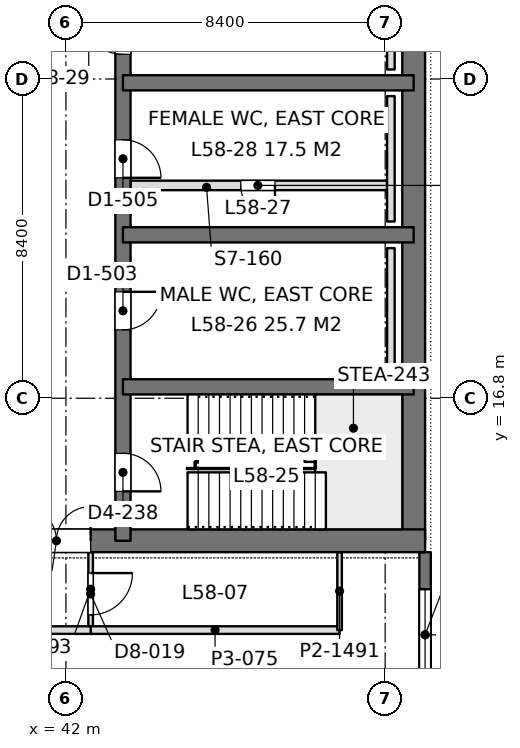
"""IFC4 building model, lengths in metres.
Left out: names, types, materials, properties, quantities, classifications, styles, units other than length and angle.
Written with IfcOpenShell. Run it as: python <this file> out.ifc"""

import sys

from ifc_helpers import new_model, si_unit, direction, frame, frame_2d, origin, place, context, subcontext, project, spatial, rectangle, extrude, element, fill, save


model = new_model("IFC4")
c1 = context("Model", 3, precision=1e-05, world=origin(), true_north=direction((0.0, 1.0)))
c2 = subcontext(c1, "Body", "Model", "MODEL_VIEW")
j1 = project(units=[si_unit("LENGTHUNIT", "METRE"), si_unit("PLANEANGLEUNIT", "RADIAN")], contexts=[c1])
p1 = place(None, origin())
s1 = spatial("IfcSite", under=j1, at=p1, CompositionType="ELEMENT")
p2 = place(p1, origin())
s2 = spatial("IfcBuilding", under=s1, at=p2, CompositionType="ELEMENT")
p3 = place(p2, frame((0.0, 0.0, 254.7)))
s3 = spatial("IfcBuildingStorey", under=s2, at=p3, CompositionType="ELEMENT", Elevation=254.7)
p4 = place(p3, frame((33.75, 13.05, 0.0), z_axis=(0.0, 0.0, 1.0), x_axis=(1.0, 0.0, 0.0)))
e1 = element("IfcWall", 1, at=p4, inside=s3, PredefinedType="SHEAR", context=c2, shape_type="SweptSolid", body=[
    extrude(rectangle(XDim=17.7, YDim=0.6, at=frame_2d((8.85, 0.0))), origin(), (0.0, 0.0, 1.0), 4.5),
])
p5 = place(p4, frame((7.1, 0.0, 0.0)))
e2 = element("IfcOpeningElement", 2, at=p5, cuts=e1, PredefinedType="OPENING", context=c2, shape_type="SweptSolid", body=[
    extrude(rectangle(XDim=1.8, YDim=2.4, at=frame_2d((0.9, 1.2))), frame((0.0, 0.31, 0.0), z_axis=(0.0, -1.0, 0.0), x_axis=(1.0, 0.0, 0.0)), (0.0, 0.0, 1.0), 0.62),
])
p6 = place(p3, frame((51.15, 13.05, 0.0), z_axis=(0.0, 0.0, 1.0), x_axis=(0.0, 1.0, 0.0)))
e3 = element("IfcWall", 3, at=p6, inside=s3, PredefinedType="SHEAR", context=c2, shape_type="SweptSolid", body=[
    extrude(rectangle(XDim=24.3, YDim=0.6, at=frame_2d((12.15, 0.0))), origin(), (0.0, 0.0, 1.0), 4.5),
])
p7 = place(p3, frame((43.5, 13.05, 0.0), z_axis=(0.0, 0.0, 1.0), x_axis=(0.0, 1.0, 0.0)))
e4 = element("IfcWall", 4, at=p7, inside=s3, PredefinedType="SHEAR", context=c2, shape_type="SweptSolid", body=[
    extrude(rectangle(XDim=24.3, YDim=0.4, at=frame_2d((12.15, 0.0))), origin(), (0.0, 0.0, 1.0), 4.5),
])
p8 = place(p7, frame((1.3, 0.0, 0.0)))
e5 = element("IfcOpeningElement", 5, at=p8, cuts=e4, PredefinedType="OPENING", context=c2, shape_type="SweptSolid", body=[
    extrude(rectangle(XDim=1.0, YDim=2.2, at=frame_2d((0.5, 1.1))), frame((0.0, 0.21, 0.0), z_axis=(0.0, -1.0, 0.0), x_axis=(1.0, 0.0, 0.0)), (0.0, 0.0, 1.0), 0.42),
])
p9 = place(p7, frame((22.0, 0.0, 0.0)))
e6 = element("IfcOpeningElement", 6, at=p9, cuts=e4, PredefinedType="OPENING", context=c2, shape_type="SweptSolid", body=[
    extrude(rectangle(XDim=1.0, YDim=2.2, at=frame_2d((0.5, 1.1))), frame((0.0, 0.21, 0.0), z_axis=(0.0, -1.0, 0.0), x_axis=(1.0, 0.0, 0.0)), (0.0, 0.0, 1.0), 0.42),
])
p10 = place(p7, frame((5.55, 0.0, 0.0)))
e7 = element("IfcOpeningElement", 7, at=p10, cuts=e4, PredefinedType="OPENING", context=c2, shape_type="SweptSolid", body=[
    extrude(rectangle(XDim=1.0, YDim=2.2, at=frame_2d((0.5, 1.1))), frame((0.0, 0.21, 0.0), z_axis=(0.0, -1.0, 0.0), x_axis=(1.0, 0.0, 0.0)), (0.0, 0.0, 1.0), 0.42),
])
p11 = place(p7, frame((9.55, 0.0, 0.0)))
e8 = element("IfcOpeningElement", 8, at=p11, cuts=e4, PredefinedType="OPENING", context=c2, shape_type="SweptSolid", body=[
    extrude(rectangle(XDim=1.0, YDim=2.2, at=frame_2d((0.5, 1.1))), frame((0.0, 0.21, 0.0), z_axis=(0.0, -1.0, 0.0), x_axis=(1.0, 0.0, 0.0)), (0.0, 0.0, 1.0), 0.42),
])
p12 = place(p7, frame((12.8, 0.0, 0.0)))
e9 = element("IfcOpeningElement", 9, at=p12, cuts=e4, PredefinedType="OPENING", context=c2, shape_type="SweptSolid", body=[
    extrude(rectangle(XDim=1.1, YDim=2.2, at=frame_2d((0.55, 1.1))), frame((0.0, 0.21, 0.0), z_axis=(0.0, -1.0, 0.0), x_axis=(1.0, 0.0, 0.0)), (0.0, 0.0, 1.0), 0.42),
])
p13 = place(p7, frame((15.538, 0.0, 0.0)))
e10 = element("IfcOpeningElement", 10, at=p13, cuts=e4, PredefinedType="OPENING", context=c2, shape_type="SweptSolid", body=[
    extrude(rectangle(XDim=1.1, YDim=2.2, at=frame_2d((0.55, 1.1))), frame((0.0, 0.21, 0.0), z_axis=(0.0, -1.0, 0.0), x_axis=(1.0, 0.0, 0.0)), (0.0, 0.0, 1.0), 0.42),
])
p14 = place(p7, frame((18.262, 0.0, 0.0)))
e11 = element("IfcOpeningElement", 11, at=p14, cuts=e4, PredefinedType="OPENING", context=c2, shape_type="SweptSolid", body=[
    extrude(rectangle(XDim=1.1, YDim=2.2, at=frame_2d((0.55, 1.1))), frame((0.0, 0.21, 0.0), z_axis=(0.0, -1.0, 0.0), x_axis=(1.0, 0.0, 0.0)), (0.0, 0.0, 1.0), 0.42),
])
for number, where, z_axis, x_axis in (
    (12, (51.15, 17.1, 0.0), (0.0, 0.0, 1.0), (-1.0, 0.0, 0.0)),
    (13, (51.15, 21.1, 0.0), (0.0, 0.0, 1.0), (-1.0, 0.0, 0.0)),
    (14, (51.15, 25.1, 0.0), (0.0, 0.0, 1.0), (-1.0, 0.0, 0.0)),
):
    element("IfcWall", number, at=place(p3, frame(where, z_axis=z_axis, x_axis=x_axis)), inside=s3, PredefinedType="SHEAR", context=c2, shape_type="SweptSolid", body=[
        extrude(rectangle(XDim=7.65, YDim=0.4, at=frame_2d((3.825, 0.0))), origin(), (0.0, 0.0, 1.0), 4.5),
    ])
p15 = place(p3, frame((51.45, 12.75, 0.0), z_axis=(0.0, 0.0, 1.0), x_axis=(0.0, -1.0, 0.0)))
e15 = element("IfcWall", 15, at=p15, inside=s3, PredefinedType="SOLIDWALL", context=c2, shape_type="SweptSolid", body=[
    extrude(rectangle(XDim=4.35, YDim=0.3, at=frame_2d((2.175, 0.0))), origin(), (0.0, 0.0, 1.0), 4.35),
])
p16 = place(p15, frame((0.975, 0.0, 0.9)))
e16 = element("IfcOpeningElement", 16, at=p16, cuts=e15, PredefinedType="OPENING", context=c2, shape_type="SweptSolid", body=[
    extrude(rectangle(XDim=2.4, YDim=1.9, at=frame_2d((1.2, 0.95))), frame((0.0, 0.16, 0.0), z_axis=(0.0, -1.0, 0.0), x_axis=(1.0, 0.0, 0.0)), (0.0, 0.0, 1.0), 0.32),
])
p17 = place(p3, frame((7.748, 10.7, 0.0), z_axis=(0.0, 0.0, 1.0), x_axis=(1.0, 0.0, 0.0)))
e17 = element("IfcWall", 17, at=p17, inside=s3, PredefinedType="PARTITIONING", context=c2, shape_type="SweptSolid", body=[
    extrude(rectangle(XDim=34.904, YDim=0.2, at=frame_2d((17.452, 0.0))), origin(), (0.0, 0.0, 1.0), 3.8),
])
p18 = place(p17, frame((4.919, 0.0, 0.0)))
e18 = element("IfcOpeningElement", 18, at=p18, cuts=e17, PredefinedType="OPENING", context=c2, shape_type="SweptSolid", body=[
    extrude(rectangle(XDim=1.8, YDim=2.2, at=frame_2d((0.9, 1.1))), frame((0.0, 0.11, 0.0), z_axis=(0.0, -1.0, 0.0), x_axis=(1.0, 0.0, 0.0)), (0.0, 0.0, 1.0), 0.22),
])
p19 = place(p17, frame((10.735, 0.0, 0.0)))
e19 = element("IfcOpeningElement", 19, at=p19, cuts=e17, PredefinedType="OPENING", context=c2, shape_type="SweptSolid", body=[
    extrude(rectangle(XDim=1.8, YDim=2.2, at=frame_2d((0.9, 1.1))), frame((0.0, 0.11, 0.0), z_axis=(0.0, -1.0, 0.0), x_axis=(1.0, 0.0, 0.0)), (0.0, 0.0, 1.0), 0.22),
])
p20 = place(p17, frame((22.369, 0.0, 0.0)))
e20 = element("IfcOpeningElement", 20, at=p20, cuts=e17, PredefinedType="OPENING", context=c2, shape_type="SweptSolid", body=[
    extrude(rectangle(XDim=1.8, YDim=2.2, at=frame_2d((0.9, 1.1))), frame((0.0, 0.11, 0.0), z_axis=(0.0, -1.0, 0.0), x_axis=(1.0, 0.0, 0.0)), (0.0, 0.0, 1.0), 0.22),
])
p21 = place(p17, frame((28.185, 0.0, 0.0)))
e21 = element("IfcOpeningElement", 21, at=p21, cuts=e17, PredefinedType="OPENING", context=c2, shape_type="SweptSolid", body=[
    extrude(rectangle(XDim=1.8, YDim=2.2, at=frame_2d((0.9, 1.1))), frame((0.0, 0.11, 0.0), z_axis=(0.0, -1.0, 0.0), x_axis=(1.0, 0.0, 0.0)), (0.0, 0.0, 1.0), 0.22),
])
p22 = place(p3, frame((42.65, 10.798, 0.0), z_axis=(0.0, 0.0, 1.0), x_axis=(0.0, 1.0, 0.0)))
e22 = element("IfcWall", 22, at=p22, inside=s3, PredefinedType="PARTITIONING", context=c2, shape_type="SweptSolid", body=[
    extrude(rectangle(XDim=1.954, YDim=0.12, at=frame_2d((0.977, 0.0))), origin(), (0.0, 0.0, 1.0), 4.35),
])
p23 = place(p22, frame((0.302, 0.0, 0.0)))
e23 = element("IfcOpeningElement", 23, at=p23, cuts=e22, PredefinedType="OPENING", context=c2, shape_type="SweptSolid", body=[
    extrude(rectangle(XDim=1.1, YDim=2.4, at=frame_2d((0.55, 1.2))), frame((0.0, 0.07, 0.0), z_axis=(0.0, -1.0, 0.0), x_axis=(1.0, 0.0, 0.0)), (0.0, 0.0, 1.0), 0.14),
])
p24 = place(p3, frame((42.648, 10.7, 0.0), z_axis=(0.0, 0.0, 1.0), x_axis=(1.0, 0.0, 0.0)))
e24 = element("IfcWall", 24, at=p24, inside=s3, PredefinedType="PARTITIONING", context=c2, shape_type="SweptSolid", body=[
    extrude(rectangle(XDim=6.552, YDim=0.2, at=frame_2d((3.276, 0.0))), origin(), (0.0, 0.0, 1.0), 4.35),
])
p25 = place(p3, frame((49.2, 10.7, 0.0), z_axis=(0.0, 0.0, 1.0), x_axis=(0.0, 1.0, 0.0)))
e25 = element("IfcWall", 25, at=p25, inside=s3, PredefinedType="PARTITIONING", context=c2, shape_type="SweptSolid", body=[
    extrude(rectangle(XDim=2.052, YDim=0.12, at=frame_2d((1.026, 0.0))), origin(), (0.0, 0.0, 1.0), 4.35),
])
p26 = place(p3, frame((43.7, 22.4, 0.0), z_axis=(0.0, 0.0, 1.0), x_axis=(1.0, 0.0, 0.0)))
e26 = element("IfcWall", 26, at=p26, inside=s3, PredefinedType="PARTITIONING", context=c2, shape_type="SweptSolid", body=[
    extrude(rectangle(XDim=6.75, YDim=0.25, at=frame_2d((3.375, 0.0))), origin(), (0.0, 0.0, 1.0), 4.3),
])
p27 = place(p26, frame((2.9, 0.0, 0.0)))
e27 = element("IfcOpeningElement", 27, at=p27, cuts=e26, PredefinedType="OPENING", context=c2, shape_type="SweptSolid", body=[
    extrude(rectangle(XDim=0.9, YDim=2.2, at=frame_2d((0.45, 1.1))), frame((0.0, 0.135, 0.0), z_axis=(0.0, -1.0, 0.0), x_axis=(1.0, 0.0, 0.0)), (0.0, 0.0, 1.0), 0.27),
])
for number, where, z_axis, x_axis in (
    (28, (50.55, 17.45, 0.0), (0.0, 0.0, 1.0), (0.0, 1.0, 0.0)),
    (29, (50.55, 21.45, 0.0), (0.0, 0.0, 1.0), (0.0, 1.0, 0.0)),
):
    element("IfcWall", number, at=place(p3, frame(where, z_axis=z_axis, x_axis=x_axis)), inside=s3, PredefinedType="PLUMBINGWALL", context=c2, shape_type="SweptSolid", body=[
        extrude(rectangle(XDim=3.3, YDim=0.2, at=frame_2d((1.65, 0.0))), origin(), (0.0, 0.0, 1.0), 1.2),
    ])
p28 = place(p3, frame((50.55, 25.45, 0.0), z_axis=(0.0, 0.0, 1.0), x_axis=(0.0, 1.0, 0.0)))
e30 = element("IfcWall", 30, at=p28, inside=s3, PredefinedType="PLUMBINGWALL", context=c2, shape_type="SweptSolid", body=[
    extrude(rectangle(XDim=1.9, YDim=0.2, at=frame_2d((0.95, 0.0))), origin(), (0.0, 0.0, 1.0), 1.2),
])
p29 = place(p16, origin())
e31 = element("IfcWindow", 31, at=p29, inside=s3, PartitioningType="SINGLE_PANEL", PredefinedType="WINDOW", context=c2, shape_type="SweptSolid", body=[
    extrude(rectangle(XDim=2.4, YDim=1.9, at=frame_2d((1.2, 0.95))), frame((0.0, 0.03, 0.0), z_axis=(0.0, -1.0, 0.0), x_axis=(1.0, 0.0, 0.0)), (0.0, 0.0, 1.0), 0.06),
])
fill(e16, e31)
p30 = place(p5, origin())
e32 = element("IfcDoor", 32, at=p30, inside=s3, OperationType="DOUBLE_DOOR_SINGLE_SWING", PredefinedType="DOOR", context=c2, shape_type="SweptSolid", body=[
    extrude(rectangle(XDim=1.8, YDim=2.4, at=frame_2d((0.9, 1.2))), frame((0.0, 0.025, 0.0), z_axis=(0.0, -1.0, 0.0), x_axis=(1.0, 0.0, 0.0)), (0.0, 0.0, 1.0), 0.05),
])
fill(e2, e32)
p31 = place(p8, frame((1.0, 0.0, 0.0), z_axis=(0.0, 0.0, 1.0), x_axis=(-1.0, 0.0, 0.0)))
e33 = element("IfcDoor", 33, at=p31, inside=s3, OperationType="SINGLE_SWING_RIGHT", PredefinedType="DOOR", context=c2, shape_type="SweptSolid", body=[
    extrude(rectangle(XDim=1.0, YDim=2.2, at=frame_2d((0.5, 1.1))), frame((0.0, 0.025, 0.0), z_axis=(0.0, -1.0, 0.0), x_axis=(1.0, 0.0, 0.0)), (0.0, 0.0, 1.0), 0.05),
])
fill(e5, e33)
p32 = place(p10, frame((1.0, 0.0, 0.0), z_axis=(0.0, 0.0, 1.0), x_axis=(-1.0, 0.0, 0.0)))
e34 = element("IfcDoor", 34, at=p32, inside=s3, OperationType="SINGLE_SWING_LEFT", PredefinedType="DOOR", context=c2, shape_type="SweptSolid", body=[
    extrude(rectangle(XDim=1.0, YDim=2.2, at=frame_2d((0.5, 1.1))), frame((0.0, 0.025, 0.0), z_axis=(0.0, -1.0, 0.0), x_axis=(1.0, 0.0, 0.0)), (0.0, 0.0, 1.0), 0.05),
])
fill(e7, e34)
p33 = place(p11, frame((1.0, 0.0, 0.0), z_axis=(0.0, 0.0, 1.0), x_axis=(-1.0, 0.0, 0.0)))
e35 = element("IfcDoor", 35, at=p33, inside=s3, OperationType="SINGLE_SWING_RIGHT", PredefinedType="DOOR", context=c2, shape_type="SweptSolid", body=[
    extrude(rectangle(XDim=1.0, YDim=2.2, at=frame_2d((0.5, 1.1))), frame((0.0, 0.025, 0.0), z_axis=(0.0, -1.0, 0.0), x_axis=(1.0, 0.0, 0.0)), (0.0, 0.0, 1.0), 0.05),
])
fill(e8, e35)
p34 = place(p12, origin())
e36 = element("IfcDoor", 36, at=p34, inside=s3, OperationType="SINGLE_SWING_RIGHT", PredefinedType="DOOR", context=c2, shape_type="SweptSolid", body=[
    extrude(rectangle(XDim=1.1, YDim=2.2, at=frame_2d((0.55, 1.1))), frame((0.0, 0.025, 0.0), z_axis=(0.0, -1.0, 0.0), x_axis=(1.0, 0.0, 0.0)), (0.0, 0.0, 1.0), 0.05),
])
fill(e9, e36)
p35 = place(p23, frame((1.1, 0.0, 0.0), z_axis=(0.0, 0.0, 1.0), x_axis=(-1.0, 0.0, 0.0)))
e37 = element("IfcDoor", 37, at=p35, inside=s3, OperationType="SINGLE_SWING_LEFT", PredefinedType="DOOR", context=c2, shape_type="SweptSolid", body=[
    extrude(rectangle(XDim=1.1, YDim=2.4, at=frame_2d((0.55, 1.2))), frame((0.0, 0.025, 0.0), z_axis=(0.0, -1.0, 0.0), x_axis=(1.0, 0.0, 0.0)), (0.0, 0.0, 1.0), 0.05),
])
fill(e23, e37)
p36 = place(p27, frame((0.9, 0.0, 0.0), z_axis=(0.0, 0.0, 1.0), x_axis=(-1.0, 0.0, 0.0)))
e38 = element("IfcDoor", 38, at=p36, inside=s3, OperationType="SINGLE_SWING_LEFT", PredefinedType="DOOR", context=c2, shape_type="SweptSolid", body=[
    extrude(rectangle(XDim=0.9, YDim=2.2, at=frame_2d((0.45, 1.1))), frame((0.0, 0.025, 0.0), z_axis=(0.0, -1.0, 0.0), x_axis=(1.0, 0.0, 0.0)), (0.0, 0.0, 1.0), 0.05),
])
fill(e27, e38)
save(model, sys.argv[1])
